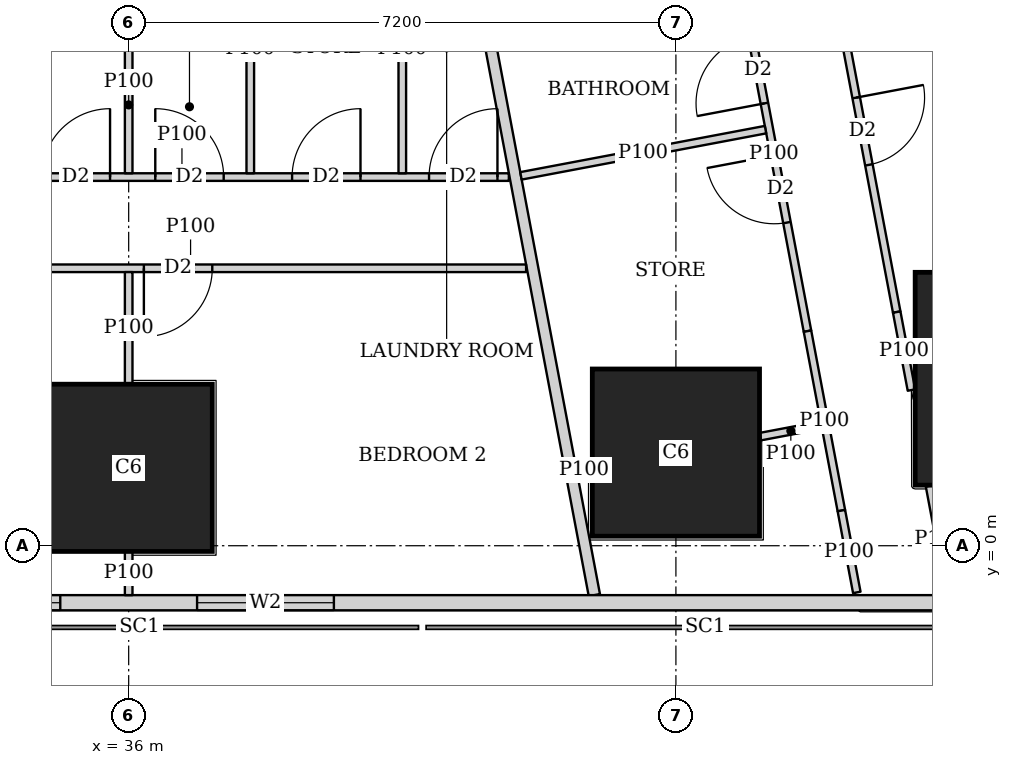
"""IFC4 building model, lengths in metres.
Left out: names, types, materials, properties, quantities, classifications, styles, units other than length and angle.
Written with IfcOpenShell. Run it as: python <this file> out.ifc"""

import sys

from ifc_helpers import new_model, si_unit, direction, frame, frame_2d, origin, origin_2d, place, context, subcontext, project, spatial, rectangle, extrude, element, fill, save


model = new_model("IFC4")
c1 = context("Model", 3, precision=1e-05, world=origin(), true_north=direction((0.0, 1.0)))
c2 = subcontext(c1, "Body", "Model", "MODEL_VIEW")
j1 = project(units=[si_unit("LENGTHUNIT", "METRE"), si_unit("PLANEANGLEUNIT", "RADIAN")], contexts=[c1])
p1 = place(None, origin())
s1 = spatial("IfcSite", under=j1, at=p1, CompositionType="ELEMENT")
p2 = place(p1, origin())
s2 = spatial("IfcBuilding", under=s1, at=p2, CompositionType="ELEMENT")
p3 = place(p2, frame((0.0, 0.0, 81.65)))
s3 = spatial("IfcBuildingStorey", under=s2, at=p3, CompositionType="ELEMENT", Elevation=81.65)
for number, where, z_axis, x_axis in (
    (1, (36.0, 1.025, 0.0), (0.0, 0.0, 1.0), (1.0, 0.0, 0.0)),
    (2, (43.2, 1.225, 0.0), (0.0, 0.0, 1.0), (1.0, 0.0, 0.0)),
):
    element("IfcColumn", number, at=place(p3, frame(where, z_axis=z_axis, x_axis=x_axis)), inside=s3, PredefinedType="COLUMN", context=c2, shape_type="SweptSolid", body=[
        extrude(rectangle(XDim=2.2, YDim=2.2, at=origin_2d()), origin(), (0.0, 0.0, 1.0), 3.75),
    ])
p4 = place(p3, frame((47.748, 2.197, 0.0), z_axis=(0.0, 0.0, 1.0), x_axis=(1.0, 0.0, 0.0)))
e3 = element("IfcColumn", 3, at=p4, inside=s3, PredefinedType="COLUMN", context=c2, shape_type="SweptSolid", body=[
    extrude(rectangle(XDim=2.8, YDim=2.8, at=origin_2d()), origin(), (0.0, 0.0, 1.0), 3.75),
])
p5 = place(p3, frame((2.163, -0.75, 0.0), z_axis=(0.0, 0.0, 1.0), x_axis=(1.0, 0.0, 0.0)))
e4 = element("IfcWall", 4, at=p5, inside=s3, PredefinedType="SOLIDWALL", context=c2, shape_type="SweptSolid", body=[
    extrude(rectangle(XDim=45.628, YDim=0.2, at=frame_2d((22.814, 0.0))), origin(), (0.0, 0.0, 1.0), 3.5),
])
p6 = place(p5, frame((9.537, 0.0, 0.9)))
e5 = element("IfcOpeningElement", 5, at=p6, cuts=e4, PredefinedType="OPENING", context=c2, shape_type="SweptSolid", body=[
    extrude(rectangle(XDim=1.8, YDim=1.5, at=frame_2d((0.9, 0.75))), frame((0.0, 0.11, 0.0), z_axis=(0.0, -1.0, 0.0), x_axis=(1.0, 0.0, 0.0)), (0.0, 0.0, 1.0), 0.22),
])
p7 = place(p5, frame((13.137, 0.0, 0.9)))
e6 = element("IfcOpeningElement", 6, at=p7, cuts=e4, PredefinedType="OPENING", context=c2, shape_type="SweptSolid", body=[
    extrude(rectangle(XDim=1.8, YDim=1.5, at=frame_2d((0.9, 0.75))), frame((0.0, 0.11, 0.0), z_axis=(0.0, -1.0, 0.0), x_axis=(1.0, 0.0, 0.0)), (0.0, 0.0, 1.0), 0.22),
])
p8 = place(p5, frame((16.737, 0.0, 0.9)))
e7 = element("IfcOpeningElement", 7, at=p8, cuts=e4, PredefinedType="OPENING", context=c2, shape_type="SweptSolid", body=[
    extrude(rectangle(XDim=1.8, YDim=1.5, at=frame_2d((0.9, 0.75))), frame((0.0, 0.11, 0.0), z_axis=(0.0, -1.0, 0.0), x_axis=(1.0, 0.0, 0.0)), (0.0, 0.0, 1.0), 0.22),
])
p9 = place(p5, frame((20.337, 0.0, 0.9)))
e8 = element("IfcOpeningElement", 8, at=p9, cuts=e4, PredefinedType="OPENING", context=c2, shape_type="SweptSolid", body=[
    extrude(rectangle(XDim=1.8, YDim=1.5, at=frame_2d((0.9, 0.75))), frame((0.0, 0.11, 0.0), z_axis=(0.0, -1.0, 0.0), x_axis=(1.0, 0.0, 0.0)), (0.0, 0.0, 1.0), 0.22),
])
p10 = place(p5, frame((23.937, 0.0, 0.9)))
e9 = element("IfcOpeningElement", 9, at=p10, cuts=e4, PredefinedType="OPENING", context=c2, shape_type="SweptSolid", body=[
    extrude(rectangle(XDim=1.8, YDim=1.5, at=frame_2d((0.9, 0.75))), frame((0.0, 0.11, 0.0), z_axis=(0.0, -1.0, 0.0), x_axis=(1.0, 0.0, 0.0)), (0.0, 0.0, 1.0), 0.22),
])
p11 = place(p5, frame((27.537, 0.0, 0.9)))
e10 = element("IfcOpeningElement", 10, at=p11, cuts=e4, PredefinedType="OPENING", context=c2, shape_type="SweptSolid", body=[
    extrude(rectangle(XDim=1.8, YDim=1.5, at=frame_2d((0.9, 0.75))), frame((0.0, 0.11, 0.0), z_axis=(0.0, -1.0, 0.0), x_axis=(1.0, 0.0, 0.0)), (0.0, 0.0, 1.0), 0.22),
])
p12 = place(p5, frame((31.137, 0.0, 0.9)))
e11 = element("IfcOpeningElement", 11, at=p12, cuts=e4, PredefinedType="OPENING", context=c2, shape_type="SweptSolid", body=[
    extrude(rectangle(XDim=1.8, YDim=1.5, at=frame_2d((0.9, 0.75))), frame((0.0, 0.11, 0.0), z_axis=(0.0, -1.0, 0.0), x_axis=(1.0, 0.0, 0.0)), (0.0, 0.0, 1.0), 0.22),
])
p13 = place(p5, frame((34.737, 0.0, 0.9)))
e12 = element("IfcOpeningElement", 12, at=p13, cuts=e4, PredefinedType="OPENING", context=c2, shape_type="SweptSolid", body=[
    extrude(rectangle(XDim=1.8, YDim=1.5, at=frame_2d((0.9, 0.75))), frame((0.0, 0.11, 0.0), z_axis=(0.0, -1.0, 0.0), x_axis=(1.0, 0.0, 0.0)), (0.0, 0.0, 1.0), 0.22),
])
p14 = place(p3, frame((50.653, 2.703, 0.0), z_axis=(0.0, 0.0, 1.0), x_axis=(-0.185612026696, 0.982623109613, 0.0)))
e13 = element("IfcWall", 13, at=p14, inside=s3, PredefinedType="SOLIDWALL", context=c2, shape_type="SweptSolid", body=[
    extrude(rectangle(XDim=41.393, YDim=0.2, at=frame_2d((20.697, 0.0))), origin(), (0.0, 0.0, 1.0), 3.5),
])
p15 = place(p14, frame((1.633, 0.0, 0.9)))
e14 = element("IfcOpeningElement", 14, at=p15, cuts=e13, PredefinedType="OPENING", context=c2, shape_type="SweptSolid", body=[
    extrude(rectangle(XDim=1.8, YDim=1.5, at=frame_2d((0.9, 0.75))), frame((0.0, 0.11, 0.0), z_axis=(0.0, -1.0, 0.0), x_axis=(1.0, 0.0, 0.0)), (0.0, 0.0, 1.0), 0.22),
])
p16 = place(p14, frame((6.032, 0.0, 0.9)))
e15 = element("IfcOpeningElement", 15, at=p16, cuts=e13, PredefinedType="OPENING", context=c2, shape_type="SweptSolid", body=[
    extrude(rectangle(XDim=1.8, YDim=1.5, at=frame_2d((0.9, 0.75))), frame((0.0, 0.11, 0.0), z_axis=(0.0, -1.0, 0.0), x_axis=(1.0, 0.0, 0.0)), (0.0, 0.0, 1.0), 0.22),
])
p17 = place(p14, frame((9.848, 0.0, 0.9)))
e16 = element("IfcOpeningElement", 16, at=p17, cuts=e13, PredefinedType="OPENING", context=c2, shape_type="SweptSolid", body=[
    extrude(rectangle(XDim=1.8, YDim=1.5, at=frame_2d((0.9, 0.75))), frame((0.0, 0.11, 0.0), z_axis=(0.0, -1.0, 0.0), x_axis=(1.0, 0.0, 0.0)), (0.0, 0.0, 1.0), 0.22),
])
p18 = place(p14, frame((13.664, 0.0, 0.9)))
e17 = element("IfcOpeningElement", 17, at=p18, cuts=e13, PredefinedType="OPENING", context=c2, shape_type="SweptSolid", body=[
    extrude(rectangle(XDim=1.8, YDim=1.5, at=frame_2d((0.9, 0.75))), frame((0.0, 0.11, 0.0), z_axis=(0.0, -1.0, 0.0), x_axis=(1.0, 0.0, 0.0)), (0.0, 0.0, 1.0), 0.22),
])
p19 = place(p14, frame((17.481, 0.0, 0.9)))
e18 = element("IfcOpeningElement", 18, at=p19, cuts=e13, PredefinedType="OPENING", context=c2, shape_type="SweptSolid", body=[
    extrude(rectangle(XDim=1.8, YDim=1.5, at=frame_2d((0.9, 0.75))), frame((0.0, 0.11, 0.0), z_axis=(0.0, -1.0, 0.0), x_axis=(1.0, 0.0, 0.0)), (0.0, 0.0, 1.0), 0.22),
])
p20 = place(p14, frame((21.297, 0.0, 0.9)))
e19 = element("IfcOpeningElement", 19, at=p20, cuts=e13, PredefinedType="OPENING", context=c2, shape_type="SweptSolid", body=[
    extrude(rectangle(XDim=1.8, YDim=1.5, at=frame_2d((0.9, 0.75))), frame((0.0, 0.11, 0.0), z_axis=(0.0, -1.0, 0.0), x_axis=(1.0, 0.0, 0.0)), (0.0, 0.0, 1.0), 0.22),
])
p21 = place(p14, frame((25.113, 0.0, 0.9)))
e20 = element("IfcOpeningElement", 20, at=p21, cuts=e13, PredefinedType="OPENING", context=c2, shape_type="SweptSolid", body=[
    extrude(rectangle(XDim=1.8, YDim=1.5, at=frame_2d((0.9, 0.75))), frame((0.0, 0.11, 0.0), z_axis=(0.0, -1.0, 0.0), x_axis=(1.0, 0.0, 0.0)), (0.0, 0.0, 1.0), 0.22),
])
p22 = place(p14, frame((28.93, 0.0, 0.9)))
e21 = element("IfcOpeningElement", 21, at=p22, cuts=e13, PredefinedType="OPENING", context=c2, shape_type="SweptSolid", body=[
    extrude(rectangle(XDim=1.8, YDim=1.5, at=frame_2d((0.9, 0.75))), frame((0.0, 0.11, 0.0), z_axis=(0.0, -1.0, 0.0), x_axis=(1.0, 0.0, 0.0)), (0.0, 0.0, 1.0), 0.22),
])
p23 = place(p14, frame((32.746, 0.0, 0.9)))
e22 = element("IfcOpeningElement", 22, at=p23, cuts=e13, PredefinedType="OPENING", context=c2, shape_type="SweptSolid", body=[
    extrude(rectangle(XDim=1.8, YDim=1.5, at=frame_2d((0.9, 0.75))), frame((0.0, 0.11, 0.0), z_axis=(0.0, -1.0, 0.0), x_axis=(1.0, 0.0, 0.0)), (0.0, 0.0, 1.0), 0.22),
])
p24 = place(p14, frame((36.481, 0.0, 0.9)))
e23 = element("IfcOpeningElement", 23, at=p24, cuts=e13, PredefinedType="OPENING", context=c2, shape_type="SweptSolid", body=[
    extrude(rectangle(XDim=1.8, YDim=1.5, at=frame_2d((0.9, 0.75))), frame((0.0, 0.11, 0.0), z_axis=(0.0, -1.0, 0.0), x_axis=(1.0, 0.0, 0.0)), (0.0, 0.0, 1.0), 0.22),
])
p25 = place(p3, frame((33.382, 45.65, 0.0), z_axis=(0.0, 0.0, 1.0), x_axis=(0.185593544777, -0.982626600565, 0.0)))
e24 = element("IfcWall", 24, at=p25, inside=s3, PredefinedType="SOLIDWALL", context=c2, shape_type="SweptSolid", body=[
    extrude(rectangle(XDim=47.118, YDim=0.15, at=frame_2d((23.559, 0.0))), origin(), (0.0, 0.0, 1.0), 2.2),
])
p26 = place(p25, frame((19.054, 0.0, 0.0)))
e25 = element("IfcOpeningElement", 25, at=p26, cuts=e24, PredefinedType="OPENING", context=c2, shape_type="SweptSolid", body=[
    extrude(rectangle(XDim=1.0, YDim=2.1, at=frame_2d((0.5, 1.05))), frame((0.0, 0.085, 0.0), z_axis=(0.0, -1.0, 0.0), x_axis=(1.0, 0.0, 0.0)), (0.0, 0.0, 1.0), 0.17),
])
p27 = place(p25, frame((22.87, 0.0, 0.0)))
e26 = element("IfcOpeningElement", 26, at=p27, cuts=e24, PredefinedType="OPENING", context=c2, shape_type="SweptSolid", body=[
    extrude(rectangle(XDim=1.0, YDim=2.1, at=frame_2d((0.5, 1.05))), frame((0.0, 0.085, 0.0), z_axis=(0.0, -1.0, 0.0), x_axis=(1.0, 0.0, 0.0)), (0.0, 0.0, 1.0), 0.17),
])
p28 = place(p25, frame((33.833, 0.0, 0.0)))
e27 = element("IfcOpeningElement", 27, at=p28, cuts=e24, PredefinedType="OPENING", context=c2, shape_type="SweptSolid", body=[
    extrude(rectangle(XDim=1.0, YDim=2.1, at=frame_2d((0.5, 1.05))), frame((0.0, 0.085, 0.0), z_axis=(0.0, -1.0, 0.0), x_axis=(1.0, 0.0, 0.0)), (0.0, 0.0, 1.0), 0.17),
])
p29 = place(p3, frame((41.229, 3.65, 0.0), z_axis=(0.0, 0.0, 1.0), x_axis=(-1.0, 0.0, 0.0)))
e28 = element("IfcWall", 28, at=p29, inside=s3, PredefinedType="PARTITIONING", context=c2, shape_type="SweptSolid", body=[
    extrude(rectangle(XDim=8.829, YDim=0.1, at=frame_2d((4.415, 0.0))), origin(), (0.0, 0.0, 1.0), 3.5),
])
p30 = place(p29, frame((7.729, 0.0, 0.0)))
e29 = element("IfcOpeningElement", 29, at=p30, cuts=e28, PredefinedType="OPENING", context=c2, shape_type="SweptSolid", body=[
    extrude(rectangle(XDim=0.9, YDim=2.1, at=frame_2d((0.45, 1.05))), frame((0.0, 0.06, 0.0), z_axis=(0.0, -1.0, 0.0), x_axis=(1.0, 0.0, 0.0)), (0.0, 0.0, 1.0), 0.12),
])
p31 = place(p29, frame((4.129, 0.0, 0.0)))
e30 = element("IfcOpeningElement", 30, at=p31, cuts=e28, PredefinedType="OPENING", context=c2, shape_type="SweptSolid", body=[
    extrude(rectangle(XDim=0.9, YDim=2.1, at=frame_2d((0.45, 1.05))), frame((0.0, 0.06, 0.0), z_axis=(0.0, -1.0, 0.0), x_axis=(1.0, 0.0, 0.0)), (0.0, 0.0, 1.0), 0.12),
])
p32 = place(p3, frame((41.002, 4.85, 0.0), z_axis=(0.0, 0.0, 1.0), x_axis=(-1.0, 0.0, 0.0)))
e31 = element("IfcWall", 31, at=p32, inside=s3, PredefinedType="PARTITIONING", context=c2, shape_type="SweptSolid", body=[
    extrude(rectangle(XDim=8.602, YDim=0.1, at=frame_2d((4.301, 0.0))), origin(), (0.0, 0.0, 1.0), 3.5),
])
p33 = place(p32, frame((7.047, 0.0, 0.0)))
e32 = element("IfcOpeningElement", 32, at=p33, cuts=e31, PredefinedType="OPENING", context=c2, shape_type="SweptSolid", body=[
    extrude(rectangle(XDim=0.9, YDim=2.1, at=frame_2d((0.45, 1.05))), frame((0.0, 0.06, 0.0), z_axis=(0.0, -1.0, 0.0), x_axis=(1.0, 0.0, 0.0)), (0.0, 0.0, 1.0), 0.12),
])
p34 = place(p32, frame((3.752, 0.0, 0.0)))
e33 = element("IfcOpeningElement", 33, at=p34, cuts=e31, PredefinedType="OPENING", context=c2, shape_type="SweptSolid", body=[
    extrude(rectangle(XDim=0.9, YDim=2.1, at=frame_2d((0.45, 1.05))), frame((0.0, 0.06, 0.0), z_axis=(0.0, -1.0, 0.0), x_axis=(1.0, 0.0, 0.0)), (0.0, 0.0, 1.0), 0.12),
])
p35 = place(p32, frame((0.15, 0.0, 0.0)))
e34 = element("IfcOpeningElement", 34, at=p35, cuts=e31, PredefinedType="OPENING", context=c2, shape_type="SweptSolid", body=[
    extrude(rectangle(XDim=0.9, YDim=2.1, at=frame_2d((0.45, 1.05))), frame((0.0, 0.06, 0.0), z_axis=(0.0, -1.0, 0.0), x_axis=(1.0, 0.0, 0.0)), (0.0, 0.0, 1.0), 0.12),
])
p36 = place(p32, frame((5.247, 0.0, 0.0)))
e35 = element("IfcOpeningElement", 35, at=p36, cuts=e31, PredefinedType="OPENING", context=c2, shape_type="SweptSolid", body=[
    extrude(rectangle(XDim=0.9, YDim=2.1, at=frame_2d((0.45, 1.05))), frame((0.0, 0.06, 0.0), z_axis=(0.0, -1.0, 0.0), x_axis=(1.0, 0.0, 0.0)), (0.0, 0.0, 1.0), 0.12),
])
p37 = place(p32, frame((1.952, 0.0, 0.0)))
e36 = element("IfcOpeningElement", 36, at=p37, cuts=e31, PredefinedType="OPENING", context=c2, shape_type="SweptSolid", body=[
    extrude(rectangle(XDim=0.9, YDim=2.1, at=frame_2d((0.45, 1.05))), frame((0.0, 0.06, 0.0), z_axis=(0.0, -1.0, 0.0), x_axis=(1.0, 0.0, 0.0)), (0.0, 0.0, 1.0), 0.12),
])
p38 = place(p3, frame((36.0, -0.65, 0.0), z_axis=(0.0, 0.0, 1.0), x_axis=(0.0, 1.0, 0.0)))
e37 = element("IfcWall", 37, at=p38, inside=s3, PredefinedType="PARTITIONING", context=c2, shape_type="SweptSolid", body=[
    extrude(rectangle(XDim=0.574, YDim=0.1, at=frame_2d((0.287, 0.0))), origin(), (0.0, 0.0, 1.0), 3.5),
])
p39 = place(p3, frame((36.0, 2.126, 0.0), z_axis=(0.0, 0.0, 1.0), x_axis=(0.0, 1.0, 0.0)))
e38 = element("IfcWall", 38, at=p39, inside=s3, PredefinedType="PARTITIONING", context=c2, shape_type="SweptSolid", body=[
    extrude(rectangle(XDim=1.474, YDim=0.1, at=frame_2d((0.737, 0.0))), origin(), (0.0, 0.0, 1.0), 3.5),
])
p40 = place(p3, frame((36.0, 4.9, 0.0), z_axis=(0.0, 0.0, 1.0), x_axis=(0.0, 1.0, 0.0)))
e39 = element("IfcWall", 39, at=p40, inside=s3, PredefinedType="PARTITIONING", context=c2, shape_type="SweptSolid", body=[
    extrude(rectangle(XDim=1.799, YDim=0.1, at=frame_2d((0.899, 0.0))), origin(), (0.0, 0.0, 1.0), 3.5),
])
for number, where, z_axis, x_axis in (
    (40, (39.6, 4.9, 0.0), (0.0, 0.0, 1.0), (0.0, 1.0, 0.0)),
    (41, (37.6, 4.9, 0.0), (0.0, 0.0, 1.0), (0.0, 1.0, 0.0)),
):
    element("IfcWall", number, at=place(p3, frame(where, z_axis=z_axis, x_axis=x_axis)), inside=s3, PredefinedType="PARTITIONING", context=c2, shape_type="SweptSolid", body=[
        extrude(rectangle(XDim=3.275, YDim=0.1, at=frame_2d((1.638, 0.0))), origin(), (0.0, 0.0, 1.0), 3.5),
    ])
p41 = place(p3, frame((44.727, 10.366, 0.0), z_axis=(0.0, 0.0, 1.0), x_axis=(0.185678775129, -0.982610498858, 0.0)))
e42 = element("IfcWall", 42, at=p41, inside=s3, PredefinedType="PARTITIONING", context=c2, shape_type="SweptSolid", body=[
    extrude(rectangle(XDim=7.421, YDim=0.1, at=frame_2d((3.71, 0.0))), origin(), (0.0, 0.0, 1.0), 3.5),
])
p42 = place(p41, frame((0.151, 0.0, 0.0)))
e43 = element("IfcOpeningElement", 43, at=p42, cuts=e42, PredefinedType="OPENING", context=c2, shape_type="SweptSolid", body=[
    extrude(rectangle(XDim=0.9, YDim=2.1, at=frame_2d((0.45, 1.05))), frame((0.0, 0.06, 0.0), z_axis=(0.0, -1.0, 0.0), x_axis=(1.0, 0.0, 0.0)), (0.0, 0.0, 1.0), 0.12),
])
p43 = place(p41, frame((4.55, 0.0, 0.0)))
e44 = element("IfcOpeningElement", 44, at=p43, cuts=e42, PredefinedType="OPENING", context=c2, shape_type="SweptSolid", body=[
    extrude(rectangle(XDim=0.9, YDim=2.1, at=frame_2d((0.45, 1.05))), frame((0.0, 0.06, 0.0), z_axis=(0.0, -1.0, 0.0), x_axis=(1.0, 0.0, 0.0)), (0.0, 0.0, 1.0), 0.12),
])
p44 = place(p3, frame((46.105, 3.074, 0.0), z_axis=(0.0, 0.0, 1.0), x_axis=(0.185897769544, -0.982569091351, 0.0)))
e45 = element("IfcWall", 45, at=p44, inside=s3, PredefinedType="PARTITIONING", context=c2, shape_type="SweptSolid", body=[
    extrude(rectangle(XDim=1.044, YDim=0.1, at=frame_2d((0.522, 0.0))), origin(), (0.0, 0.0, 1.0), 2.05),
])
p45 = place(p3, frame((46.537, 0.787, 0.0), z_axis=(0.0, 0.0, 1.0), x_axis=(0.185348284603, -0.982672892368, 0.0)))
e46 = element("IfcWall", 46, at=p45, inside=s3, PredefinedType="PARTITIONING", context=c2, shape_type="SweptSolid", body=[
    extrude(rectangle(XDim=1.419, YDim=0.1, at=frame_2d((0.709, 0.0))), origin(), (0.0, 0.0, 1.0), 2.05),
])
p46 = place(p3, frame((44.049, 7.49, 0.0), z_axis=(0.0, 0.0, 1.0), x_axis=(0.185666332607, -0.982612849975, 0.0)))
e47 = element("IfcWall", 47, at=p46, inside=s3, PredefinedType="PARTITIONING", context=c2, shape_type="SweptSolid", body=[
    extrude(rectangle(XDim=4.75, YDim=0.1, at=frame_2d((2.375, 0.0))), origin(), (0.0, 0.0, 1.0), 3.5),
])
p47 = place(p46, frame((0.8, 0.0, 0.0)))
e48 = element("IfcOpeningElement", 48, at=p47, cuts=e47, PredefinedType="OPENING", context=c2, shape_type="SweptSolid", body=[
    extrude(rectangle(XDim=0.9, YDim=2.1, at=frame_2d((0.45, 1.05))), frame((0.0, 0.06, 0.0), z_axis=(0.0, -1.0, 0.0), x_axis=(1.0, 0.0, 0.0)), (0.0, 0.0, 1.0), 0.12),
])
p48 = place(p46, frame((2.396, 0.0, 0.0)))
e49 = element("IfcOpeningElement", 49, at=p48, cuts=e47, PredefinedType="OPENING", context=c2, shape_type="SweptSolid", body=[
    extrude(rectangle(XDim=0.9, YDim=2.1, at=frame_2d((0.45, 1.05))), frame((0.0, 0.06, 0.0), z_axis=(0.0, -1.0, 0.0), x_axis=(1.0, 0.0, 0.0)), (0.0, 0.0, 1.0), 0.12),
])
p49 = place(p3, frame((44.931, 2.823, 0.0), z_axis=(0.0, 0.0, 1.0), x_axis=(0.185631845838, -0.982619365681, 0.0)))
e50 = element("IfcWall", 50, at=p49, inside=s3, PredefinedType="PARTITIONING", context=c2, shape_type="SweptSolid", body=[
    extrude(rectangle(XDim=2.403, YDim=0.1, at=frame_2d((1.201, 0.0))), origin(), (0.0, 0.0, 1.0), 2.05),
])
p50 = place(p3, frame((45.377, 0.462, 0.0), z_axis=(0.0, 0.0, 1.0), x_axis=(0.185513480919, -0.982641719243, 0.0)))
e51 = element("IfcWall", 51, at=p50, inside=s3, PredefinedType="PARTITIONING", context=c2, shape_type="SweptSolid", body=[
    extrude(rectangle(XDim=1.095, YDim=0.1, at=frame_2d((0.547, 0.0))), origin(), (0.0, 0.0, 1.0), 3.5),
])
p51 = place(p3, frame((45.114, 1.587, 0.0), z_axis=(0.0, 0.0, 1.0), x_axis=(-0.982624706348, -0.185603573443, 0.0)))
e52 = element("IfcWall", 52, at=p51, inside=s3, PredefinedType="PARTITIONING", context=c2, shape_type="SweptSolid", body=[
    extrude(rectangle(XDim=0.818, YDim=0.1, at=frame_2d((0.409, 0.0))), origin(), (0.0, 0.0, 1.0), 2.05),
])
p52 = place(p3, frame((42.09, 1.016, 0.0), z_axis=(0.0, 0.0, 1.0), x_axis=(-0.982208563973, -0.187793335502, 0.0)))
e53 = element("IfcWall", 53, at=p52, inside=s3, PredefinedType="PARTITIONING", context=c2, shape_type="SweptSolid", body=[
    extrude(rectangle(XDim=0.198, YDim=0.1, at=frame_2d((0.099, 0.0))), origin(), (0.0, 0.0, 1.0), 2.05),
])
p53 = place(p3, frame((44.379, 5.474, 0.0), z_axis=(0.0, 0.0, 1.0), x_axis=(-0.982607026909, -0.185697147715, 0.0)))
e54 = element("IfcWall", 54, at=p53, inside=s3, PredefinedType="PARTITIONING", context=c2, shape_type="SweptSolid", body=[
    extrude(rectangle(XDim=3.275, YDim=0.1, at=frame_2d((1.637, 0.0))), origin(), (0.0, 0.0, 1.0), 3.5),
])
p54 = place(p12, origin())
e55 = element("IfcWindow", 55, at=p54, inside=s3, PartitioningType="SINGLE_PANEL", PredefinedType="WINDOW", context=c2, shape_type="SweptSolid", body=[
    extrude(rectangle(XDim=1.8, YDim=1.5, at=frame_2d((0.9, 0.75))), frame((0.0, 0.03, 0.0), z_axis=(0.0, -1.0, 0.0), x_axis=(1.0, 0.0, 0.0)), (0.0, 0.0, 1.0), 0.06),
])
fill(e11, e55)
p55 = place(p13, origin())
e56 = element("IfcWindow", 56, at=p55, inside=s3, PartitioningType="SINGLE_PANEL", PredefinedType="WINDOW", context=c2, shape_type="SweptSolid", body=[
    extrude(rectangle(XDim=1.8, YDim=1.5, at=frame_2d((0.9, 0.75))), frame((0.0, 0.03, 0.0), z_axis=(0.0, -1.0, 0.0), x_axis=(1.0, 0.0, 0.0)), (0.0, 0.0, 1.0), 0.06),
])
fill(e12, e56)
p56 = place(p31, origin())
e57 = element("IfcDoor", 57, at=p56, inside=s3, OperationType="SINGLE_SWING_RIGHT", PredefinedType="DOOR", context=c2, shape_type="SweptSolid", body=[
    extrude(rectangle(XDim=0.9, YDim=2.1, at=frame_2d((0.45, 1.05))), frame((0.0, 0.025, 0.0), z_axis=(0.0, -1.0, 0.0), x_axis=(1.0, 0.0, 0.0)), (0.0, 0.0, 1.0), 0.05),
])
fill(e30, e57)
p57 = place(p34, origin())
e58 = element("IfcDoor", 58, at=p57, inside=s3, OperationType="SINGLE_SWING_LEFT", PredefinedType="DOOR", context=c2, shape_type="SweptSolid", body=[
    extrude(rectangle(XDim=0.9, YDim=2.1, at=frame_2d((0.45, 1.05))), frame((0.0, 0.025, 0.0), z_axis=(0.0, -1.0, 0.0), x_axis=(1.0, 0.0, 0.0)), (0.0, 0.0, 1.0), 0.05),
])
fill(e33, e58)
p58 = place(p35, origin())
e59 = element("IfcDoor", 59, at=p58, inside=s3, OperationType="SINGLE_SWING_RIGHT", PredefinedType="DOOR", context=c2, shape_type="SweptSolid", body=[
    extrude(rectangle(XDim=0.9, YDim=2.1, at=frame_2d((0.45, 1.05))), frame((0.0, 0.025, 0.0), z_axis=(0.0, -1.0, 0.0), x_axis=(1.0, 0.0, 0.0)), (0.0, 0.0, 1.0), 0.05),
])
fill(e34, e59)
p59 = place(p36, origin())
e60 = element("IfcDoor", 60, at=p59, inside=s3, OperationType="SINGLE_SWING_RIGHT", PredefinedType="DOOR", context=c2, shape_type="SweptSolid", body=[
    extrude(rectangle(XDim=0.9, YDim=2.1, at=frame_2d((0.45, 1.05))), frame((0.0, 0.025, 0.0), z_axis=(0.0, -1.0, 0.0), x_axis=(1.0, 0.0, 0.0)), (0.0, 0.0, 1.0), 0.05),
])
fill(e35, e60)
p60 = place(p37, origin())
e61 = element("IfcDoor", 61, at=p60, inside=s3, OperationType="SINGLE_SWING_RIGHT", PredefinedType="DOOR", context=c2, shape_type="SweptSolid", body=[
    extrude(rectangle(XDim=0.9, YDim=2.1, at=frame_2d((0.45, 1.05))), frame((0.0, 0.025, 0.0), z_axis=(0.0, -1.0, 0.0), x_axis=(1.0, 0.0, 0.0)), (0.0, 0.0, 1.0), 0.05),
])
fill(e36, e61)
p61 = place(p43, origin())
e62 = element("IfcDoor", 62, at=p61, inside=s3, OperationType="SINGLE_SWING_LEFT", PredefinedType="DOOR", context=c2, shape_type="SweptSolid", body=[
    extrude(rectangle(XDim=0.9, YDim=2.1, at=frame_2d((0.45, 1.05))), frame((0.0, 0.025, 0.0), z_axis=(0.0, -1.0, 0.0), x_axis=(1.0, 0.0, 0.0)), (0.0, 0.0, 1.0), 0.05),
])
fill(e44, e62)
p62 = place(p47, origin())
e63 = element("IfcDoor", 63, at=p62, inside=s3, OperationType="SINGLE_SWING_LEFT", PredefinedType="DOOR", context=c2, shape_type="SweptSolid", body=[
    extrude(rectangle(XDim=0.9, YDim=2.1, at=frame_2d((0.45, 1.05))), frame((0.0, 0.025, 0.0), z_axis=(0.0, -1.0, 0.0), x_axis=(1.0, 0.0, 0.0)), (0.0, 0.0, 1.0), 0.05),
])
fill(e48, e63)
p63 = place(p48, origin())
e64 = element("IfcDoor", 64, at=p63, inside=s3, OperationType="SINGLE_SWING_RIGHT", PredefinedType="DOOR", context=c2, shape_type="SweptSolid", body=[
    extrude(rectangle(XDim=0.9, YDim=2.1, at=frame_2d((0.45, 1.05))), frame((0.0, 0.025, 0.0), z_axis=(0.0, -1.0, 0.0), x_axis=(1.0, 0.0, 0.0)), (0.0, 0.0, 1.0), 0.05),
])
fill(e49, e64)
save(model, sys.argv[1])
